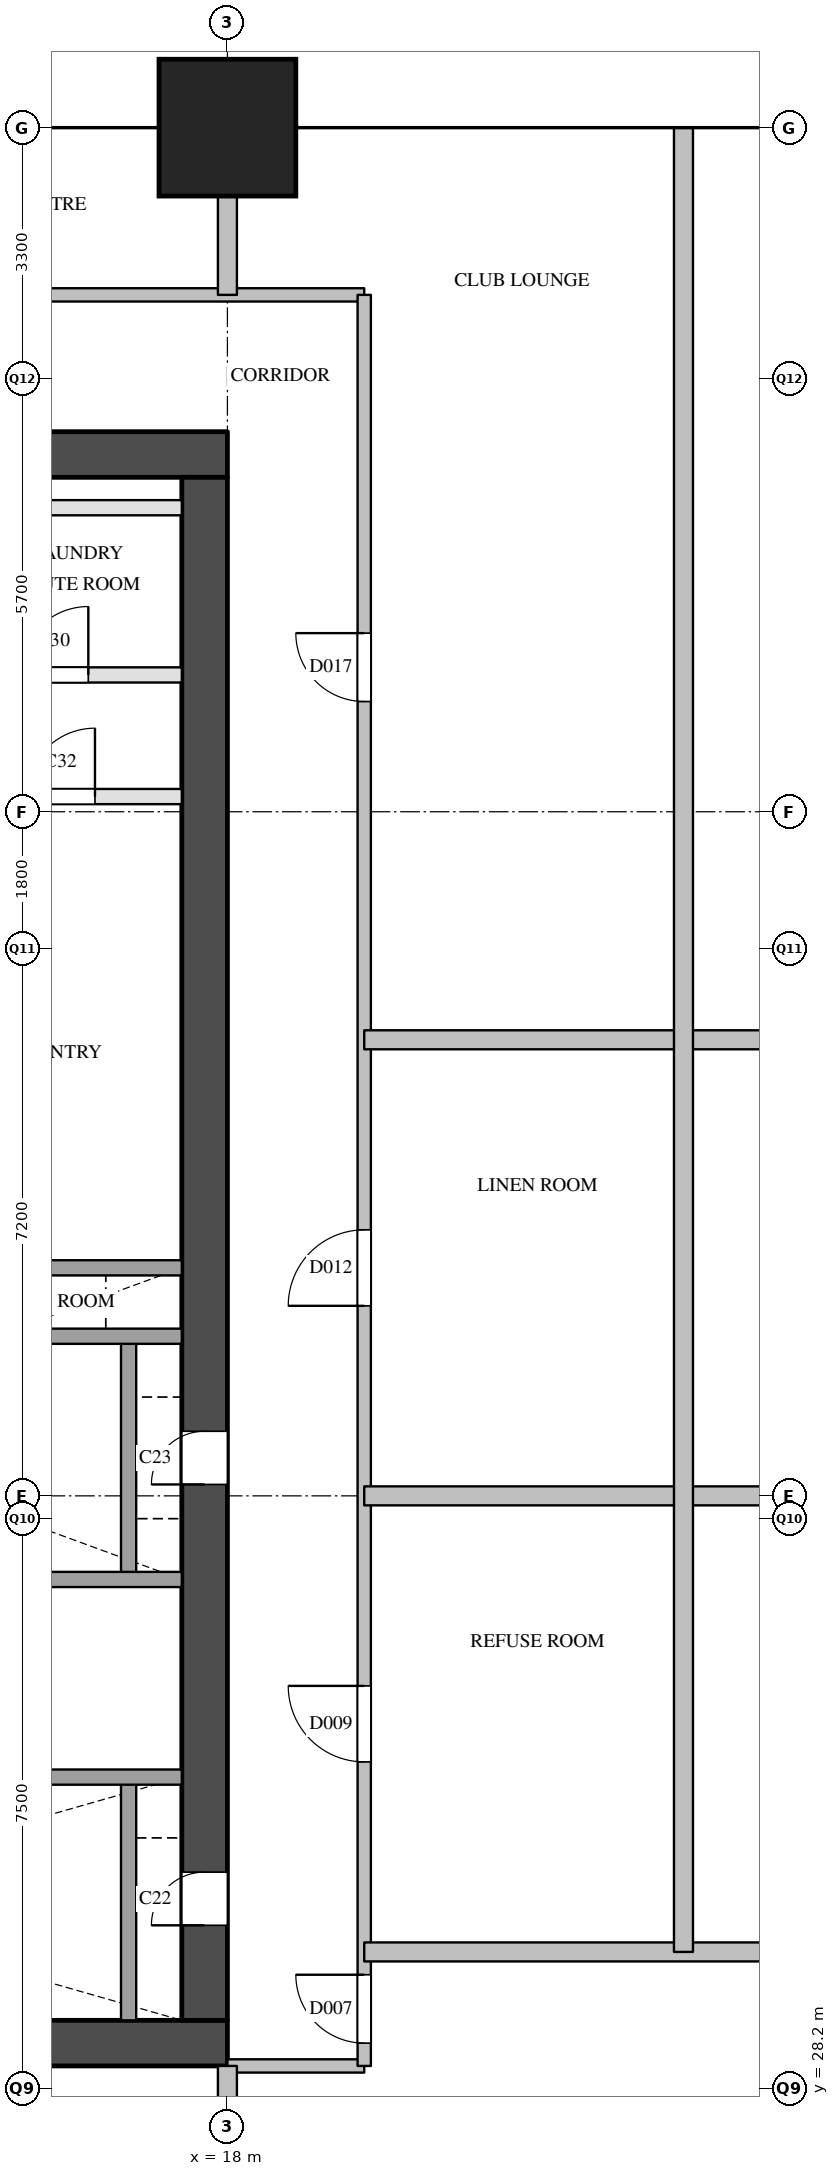
"""IFC4 building model, lengths in metres.
Left out: names, types, materials, properties, quantities, classifications, styles, units other than length and angle.
Written with IfcOpenShell. Run it as: python <this file> out.ifc"""

import sys

from ifc_helpers import new_model, si_unit, direction, frame, frame_2d, origin, origin_2d, place, context, subcontext, project, spatial, rectangle, extrude, element, fill, save


model = new_model("IFC4")
c1 = context("Model", 3, precision=1e-05, world=origin(), true_north=direction((0.0, 1.0)))
c2 = subcontext(c1, "Body", "Model", "MODEL_VIEW")
j1 = project(units=[si_unit("LENGTHUNIT", "METRE"), si_unit("PLANEANGLEUNIT", "RADIAN")], contexts=[c1])
p1 = place(None, origin())
s1 = spatial("IfcSite", under=j1, at=p1, CompositionType="ELEMENT")
p2 = place(p1, origin())
s2 = spatial("IfcBuilding", under=s1, at=p2, CompositionType="ELEMENT")
p3 = place(p2, frame((0.0, 0.0, 115.8)))
s3 = spatial("IfcBuildingStorey", under=s2, at=p3, CompositionType="ELEMENT", Elevation=115.8)
p4 = place(p3, frame((18.0, 54.0, 0.0), z_axis=(0.0, 0.0, 1.0), x_axis=(1.0, 0.0, 0.0)))
e1 = element("IfcColumn", 1, at=p4, inside=s3, PredefinedType="COLUMN", context=c2, shape_type="SweptSolid", body=[
    extrude(rectangle(XDim=1.8, YDim=1.8, at=origin_2d()), origin(), (0.0, 0.0, 1.0), 3.8),
])
p5 = place(p3, frame((5.6, 28.8, 0.0), z_axis=(0.0, 0.0, 1.0), x_axis=(1.0, 0.0, 0.0)))
e2 = element("IfcWall", 2, at=p5, inside=s3, PredefinedType="SHEAR", context=c2, shape_type="SweptSolid", body=[
    extrude(rectangle(XDim=12.4, YDim=0.6, at=frame_2d((6.2, 0.0))), origin(), (0.0, 0.0, 1.0), 3.5),
])
p6 = place(p5, frame((1.05, 0.0, 0.0)))
e3 = element("IfcOpeningElement", 3, at=p6, cuts=e2, PredefinedType="OPENING", context=c2, shape_type="SweptSolid", body=[
    extrude(rectangle(XDim=1.2, YDim=2.1, at=frame_2d((0.6, 1.05))), frame((0.0, 0.31, 0.0), z_axis=(0.0, -1.0, 0.0), x_axis=(1.0, 0.0, 0.0)), (0.0, 0.0, 1.0), 0.62),
])
p7 = place(p5, frame((5.25, 0.0, 0.0)))
e4 = element("IfcOpeningElement", 4, at=p7, cuts=e2, PredefinedType="OPENING", context=c2, shape_type="SweptSolid", body=[
    extrude(rectangle(XDim=1.2, YDim=2.1, at=frame_2d((0.6, 1.05))), frame((0.0, 0.31, 0.0), z_axis=(0.0, -1.0, 0.0), x_axis=(1.0, 0.0, 0.0)), (0.0, 0.0, 1.0), 0.62),
])
p8 = place(p5, frame((7.35, 0.0, 0.0)))
e5 = element("IfcOpeningElement", 5, at=p8, cuts=e2, PredefinedType="OPENING", context=c2, shape_type="SweptSolid", body=[
    extrude(rectangle(XDim=1.2, YDim=2.1, at=frame_2d((0.6, 1.05))), frame((0.0, 0.31, 0.0), z_axis=(0.0, -1.0, 0.0), x_axis=(1.0, 0.0, 0.0)), (0.0, 0.0, 1.0), 0.62),
])
p9 = place(p3, frame((5.6, 49.7, 0.0), z_axis=(0.0, 0.0, 1.0), x_axis=(1.0, 0.0, 0.0)))
e6 = element("IfcWall", 6, at=p9, inside=s3, PredefinedType="SHEAR", context=c2, shape_type="SweptSolid", body=[
    extrude(rectangle(XDim=12.4, YDim=0.6, at=frame_2d((6.2, 0.0))), origin(), (0.0, 0.0, 1.0), 3.5),
])
p10 = place(p3, frame((17.7, 29.1, 0.0), z_axis=(0.0, 0.0, 1.0), x_axis=(0.0, 1.0, 0.0)))
e7 = element("IfcWall", 7, at=p10, inside=s3, PredefinedType="SHEAR", context=c2, shape_type="SweptSolid", body=[
    extrude(rectangle(XDim=20.3, YDim=0.6, at=frame_2d((10.15, 0.0))), origin(), (0.0, 0.0, 1.0), 3.5),
])
p11 = place(p10, frame((1.25, 0.0, 0.0)))
e8 = element("IfcOpeningElement", 8, at=p11, cuts=e7, PredefinedType="OPENING", context=c2, shape_type="SweptSolid", body=[
    extrude(rectangle(XDim=0.7, YDim=2.1, at=frame_2d((0.35, 1.05))), frame((0.0, 0.31, 0.0), z_axis=(0.0, -1.0, 0.0), x_axis=(1.0, 0.0, 0.0)), (0.0, 0.0, 1.0), 0.62),
])
p12 = place(p10, frame((7.05, 0.0, 0.0)))
e9 = element("IfcOpeningElement", 9, at=p12, cuts=e7, PredefinedType="OPENING", context=c2, shape_type="SweptSolid", body=[
    extrude(rectangle(XDim=0.7, YDim=2.1, at=frame_2d((0.35, 1.05))), frame((0.0, 0.31, 0.0), z_axis=(0.0, -1.0, 0.0), x_axis=(1.0, 0.0, 0.0)), (0.0, 0.0, 1.0), 0.62),
])
p13 = place(p3, frame((16.7, 29.1, 0.0), z_axis=(0.0, 0.0, 1.0), x_axis=(0.0, 1.0, 0.0)))
e10 = element("IfcWall", 10, at=p13, inside=s3, PredefinedType="SOLIDWALL", context=c2, shape_type="SweptSolid", body=[
    extrude(rectangle(XDim=3.2, YDim=0.2, at=frame_2d((1.6, 0.0))), origin(), (0.0, 0.0, 1.0), 3.5),
])
p14 = place(p3, frame((16.7, 34.9, 0.0), z_axis=(0.0, 0.0, 1.0), x_axis=(0.0, 1.0, 0.0)))
e11 = element("IfcWall", 11, at=p14, inside=s3, PredefinedType="SOLIDWALL", context=c2, shape_type="SweptSolid", body=[
    extrude(rectangle(XDim=3.2, YDim=0.2, at=frame_2d((1.6, 0.0))), origin(), (0.0, 0.0, 1.0), 3.5),
])
p15 = place(p3, frame((6.2, 32.3, 0.0), z_axis=(0.0, 0.0, 1.0), x_axis=(1.0, 0.0, 0.0)))
e12 = element("IfcWall", 12, at=p15, inside=s3, PredefinedType="SOLIDWALL", context=c2, shape_type="SweptSolid", body=[
    extrude(rectangle(XDim=11.2, YDim=0.2, at=frame_2d((5.6, 0.0))), origin(), (0.0, 0.0, 1.0), 3.5),
])
p16 = place(p15, frame((2.55, 0.0, 0.0)))
e13 = element("IfcOpeningElement", 13, at=p16, cuts=e12, PredefinedType="OPENING", context=c2, shape_type="SweptSolid", body=[
    extrude(rectangle(XDim=1.2, YDim=2.1, at=frame_2d((0.6, 1.05))), frame((0.0, 0.11, 0.0), z_axis=(0.0, -1.0, 0.0), x_axis=(1.0, 0.0, 0.0)), (0.0, 0.0, 1.0), 0.22),
])
p17 = place(p3, frame((6.2, 34.9, 0.0), z_axis=(0.0, 0.0, 1.0), x_axis=(1.0, 0.0, 0.0)))
e14 = element("IfcWall", 14, at=p17, inside=s3, PredefinedType="SOLIDWALL", context=c2, shape_type="SweptSolid", body=[
    extrude(rectangle(XDim=11.2, YDim=0.2, at=frame_2d((5.6, 0.0))), origin(), (0.0, 0.0, 1.0), 3.5),
])
p18 = place(p3, frame((6.2, 38.1, 0.0), z_axis=(0.0, 0.0, 1.0), x_axis=(1.0, 0.0, 0.0)))
e15 = element("IfcWall", 15, at=p18, inside=s3, PredefinedType="SOLIDWALL", context=c2, shape_type="SweptSolid", body=[
    extrude(rectangle(XDim=11.2, YDim=0.2, at=frame_2d((5.6, 0.0))), origin(), (0.0, 0.0, 1.0), 3.5),
])
p19 = place(p18, frame((0.45, 0.0, 0.0)))
e16 = element("IfcOpeningElement", 16, at=p19, cuts=e15, PredefinedType="OPENING", context=c2, shape_type="SweptSolid", body=[
    extrude(rectangle(XDim=1.2, YDim=2.1, at=frame_2d((0.6, 1.05))), frame((0.0, 0.11, 0.0), z_axis=(0.0, -1.0, 0.0), x_axis=(1.0, 0.0, 0.0)), (0.0, 0.0, 1.0), 0.22),
])
p20 = place(p18, frame((2.55, 0.0, 0.0)))
e17 = element("IfcOpeningElement", 17, at=p20, cuts=e15, PredefinedType="OPENING", context=c2, shape_type="SweptSolid", body=[
    extrude(rectangle(XDim=1.2, YDim=2.1, at=frame_2d((0.6, 1.05))), frame((0.0, 0.11, 0.0), z_axis=(0.0, -1.0, 0.0), x_axis=(1.0, 0.0, 0.0)), (0.0, 0.0, 1.0), 0.22),
])
p21 = place(p18, frame((4.65, 0.0, 0.0)))
e18 = element("IfcOpeningElement", 18, at=p21, cuts=e15, PredefinedType="OPENING", context=c2, shape_type="SweptSolid", body=[
    extrude(rectangle(XDim=1.2, YDim=2.1, at=frame_2d((0.6, 1.05))), frame((0.0, 0.11, 0.0), z_axis=(0.0, -1.0, 0.0), x_axis=(1.0, 0.0, 0.0)), (0.0, 0.0, 1.0), 0.22),
])
p22 = place(p18, frame((6.75, 0.0, 0.0)))
e19 = element("IfcOpeningElement", 19, at=p22, cuts=e15, PredefinedType="OPENING", context=c2, shape_type="SweptSolid", body=[
    extrude(rectangle(XDim=1.2, YDim=2.1, at=frame_2d((0.6, 1.05))), frame((0.0, 0.11, 0.0), z_axis=(0.0, -1.0, 0.0), x_axis=(1.0, 0.0, 0.0)), (0.0, 0.0, 1.0), 0.22),
])
p23 = place(p3, frame((12.5, 39.0, 0.0), z_axis=(0.0, 0.0, 1.0), x_axis=(1.0, 0.0, 0.0)))
e20 = element("IfcWall", 20, at=p23, inside=s3, PredefinedType="SOLIDWALL", context=c2, shape_type="SweptSolid", body=[
    extrude(rectangle(XDim=4.9, YDim=0.2, at=frame_2d((2.45, 0.0))), origin(), (0.0, 0.0, 1.0), 3.5),
])
p24 = place(p3, frame((12.5, 45.2, 0.0), z_axis=(0.0, 0.0, 1.0), x_axis=(1.0, 0.0, 0.0)))
e21 = element("IfcWall", 21, at=p24, inside=s3, PredefinedType="PARTITIONING", context=c2, shape_type="SweptSolid", body=[
    extrude(rectangle(XDim=4.9, YDim=0.2, at=frame_2d((2.45, 0.0))), origin(), (0.0, 0.0, 1.0), 3.5),
])
p25 = place(p24, frame((0.407, 0.0, 0.0)))
e22 = element("IfcOpeningElement", 22, at=p25, cuts=e21, PredefinedType="OPENING", context=c2, shape_type="SweptSolid", body=[
    extrude(rectangle(XDim=0.9, YDim=2.1, at=frame_2d((0.45, 1.05))), frame((0.0, 0.11, 0.0), z_axis=(0.0, -1.0, 0.0), x_axis=(1.0, 0.0, 0.0)), (0.0, 0.0, 1.0), 0.22),
])
p26 = place(p24, frame((2.857, 0.0, 0.0)))
e23 = element("IfcOpeningElement", 23, at=p26, cuts=e21, PredefinedType="OPENING", context=c2, shape_type="SweptSolid", body=[
    extrude(rectangle(XDim=0.9, YDim=2.1, at=frame_2d((0.45, 1.05))), frame((0.0, 0.11, 0.0), z_axis=(0.0, -1.0, 0.0), x_axis=(1.0, 0.0, 0.0)), (0.0, 0.0, 1.0), 0.22),
])
p27 = place(p3, frame((6.2, 46.8, 0.0), z_axis=(0.0, 0.0, 1.0), x_axis=(1.0, 0.0, 0.0)))
e24 = element("IfcWall", 24, at=p27, inside=s3, PredefinedType="PARTITIONING", context=c2, shape_type="SweptSolid", body=[
    extrude(rectangle(XDim=11.2, YDim=0.2, at=frame_2d((5.6, 0.0))), origin(), (0.0, 0.0, 1.0), 3.5),
])
p28 = place(p27, frame((0.67, 0.0, 0.0)))
e25 = element("IfcOpeningElement", 25, at=p28, cuts=e24, PredefinedType="OPENING", context=c2, shape_type="SweptSolid", body=[
    extrude(rectangle(XDim=0.9, YDim=2.1, at=frame_2d((0.45, 1.05))), frame((0.0, 0.11, 0.0), z_axis=(0.0, -1.0, 0.0), x_axis=(1.0, 0.0, 0.0)), (0.0, 0.0, 1.0), 0.22),
])
p29 = place(p27, frame((4.59, 0.0, 0.0)))
e26 = element("IfcOpeningElement", 26, at=p29, cuts=e24, PredefinedType="OPENING", context=c2, shape_type="SweptSolid", body=[
    extrude(rectangle(XDim=0.9, YDim=2.1, at=frame_2d((0.45, 1.05))), frame((0.0, 0.11, 0.0), z_axis=(0.0, -1.0, 0.0), x_axis=(1.0, 0.0, 0.0)), (0.0, 0.0, 1.0), 0.22),
])
p30 = place(p27, frame((9.07, 0.0, 0.0)))
e27 = element("IfcOpeningElement", 27, at=p30, cuts=e24, PredefinedType="OPENING", context=c2, shape_type="SweptSolid", body=[
    extrude(rectangle(XDim=0.9, YDim=2.1, at=frame_2d((0.45, 1.05))), frame((0.0, 0.11, 0.0), z_axis=(0.0, -1.0, 0.0), x_axis=(1.0, 0.0, 0.0)), (0.0, 0.0, 1.0), 0.22),
])
p31 = place(p3, frame((6.2, 49.0, 0.0), z_axis=(0.0, 0.0, 1.0), x_axis=(1.0, 0.0, 0.0)))
e28 = element("IfcWall", 28, at=p31, inside=s3, PredefinedType="PARTITIONING", context=c2, shape_type="SweptSolid", body=[
    extrude(rectangle(XDim=11.2, YDim=0.2, at=frame_2d((5.6, 0.0))), origin(), (0.0, 0.0, 1.0), 3.5),
])
p32 = place(p3, frame((18.0, 28.5, 0.0), z_axis=(0.0, 0.0, 1.0), x_axis=(1.0, 0.0, 0.0)))
e29 = element("IfcWall", 29, at=p32, inside=s3, PredefinedType="PARTITIONING", context=c2, shape_type="SweptSolid", body=[
    extrude(rectangle(XDim=1.8, YDim=0.175, at=frame_2d((0.9, 0.0))), origin(), (0.0, 0.0, 1.0), 3.5),
])
p33 = place(p3, frame((3.8, 51.8, 0.0), z_axis=(0.0, 0.0, 1.0), x_axis=(1.0, 0.0, 0.0)))
e30 = element("IfcWall", 30, at=p33, inside=s3, PredefinedType="PARTITIONING", context=c2, shape_type="SweptSolid", body=[
    extrude(rectangle(XDim=16.0, YDim=0.175, at=frame_2d((8.0, 0.0))), origin(), (0.0, 0.0, 1.0), 3.5),
])
p34 = place(p33, frame((7.75, 0.0, 0.0)))
e31 = element("IfcOpeningElement", 31, at=p34, cuts=e30, PredefinedType="OPENING", context=c2, shape_type="SweptSolid", body=[
    extrude(rectangle(XDim=0.9, YDim=2.1, at=frame_2d((0.45, 1.05))), frame((0.0, 0.097, 0.0), z_axis=(0.0, -1.0, 0.0), x_axis=(1.0, 0.0, 0.0)), (0.0, 0.0, 1.0), 0.195),
])
p35 = place(p3, frame((19.8, 28.5, 0.0), z_axis=(0.0, 0.0, 1.0), x_axis=(0.0, 1.0, 0.0)))
e32 = element("IfcWall", 32, at=p35, inside=s3, PredefinedType="PARTITIONING", context=c2, shape_type="SweptSolid", body=[
    extrude(rectangle(XDim=23.3, YDim=0.175, at=frame_2d((11.65, 0.0))), origin(), (0.0, 0.0, 1.0), 3.5),
])
p36 = place(p35, frame((0.3, 0.0, 0.0)))
e33 = element("IfcOpeningElement", 33, at=p36, cuts=e32, PredefinedType="OPENING", context=c2, shape_type="SweptSolid", body=[
    extrude(rectangle(XDim=0.9, YDim=2.1, at=frame_2d((0.45, 1.05))), frame((0.0, 0.097, 0.0), z_axis=(0.0, -1.0, 0.0), x_axis=(1.0, 0.0, 0.0)), (0.0, 0.0, 1.0), 0.195),
])
p37 = place(p35, frame((4.0, 0.0, 0.0)))
e34 = element("IfcOpeningElement", 34, at=p37, cuts=e32, PredefinedType="OPENING", context=c2, shape_type="SweptSolid", body=[
    extrude(rectangle(XDim=1.0, YDim=2.1, at=frame_2d((0.5, 1.05))), frame((0.0, 0.097, 0.0), z_axis=(0.0, -1.0, 0.0), x_axis=(1.0, 0.0, 0.0)), (0.0, 0.0, 1.0), 0.195),
])
p38 = place(p35, frame((10.0, 0.0, 0.0)))
e35 = element("IfcOpeningElement", 35, at=p38, cuts=e32, PredefinedType="OPENING", context=c2, shape_type="SweptSolid", body=[
    extrude(rectangle(XDim=1.0, YDim=2.1, at=frame_2d((0.5, 1.05))), frame((0.0, 0.097, 0.0), z_axis=(0.0, -1.0, 0.0), x_axis=(1.0, 0.0, 0.0)), (0.0, 0.0, 1.0), 0.195),
])
p39 = place(p35, frame((17.95, 0.0, 0.0)))
e36 = element("IfcOpeningElement", 36, at=p39, cuts=e32, PredefinedType="OPENING", context=c2, shape_type="SweptSolid", body=[
    extrude(rectangle(XDim=0.9, YDim=2.1, at=frame_2d((0.45, 1.05))), frame((0.0, 0.097, 0.0), z_axis=(0.0, -1.0, 0.0), x_axis=(1.0, 0.0, 0.0)), (0.0, 0.0, 1.0), 0.195),
])
p40 = place(p3, frame((19.8, 30.0, 0.0), z_axis=(0.0, 0.0, 1.0), x_axis=(1.0, 0.0, 0.0)))
e37 = element("IfcWall", 37, at=p40, inside=s3, PredefinedType="PARTITIONING", context=c2, shape_type="SweptSolid", body=[
    extrude(rectangle(XDim=14.4, YDim=0.25, at=frame_2d((7.2, 0.0))), origin(), (0.0, 0.0, 1.0), 2.5),
])
p41 = place(p3, frame((19.8, 36.0, 0.0), z_axis=(0.0, 0.0, 1.0), x_axis=(1.0, 0.0, 0.0)))
e38 = element("IfcWall", 38, at=p41, inside=s3, PredefinedType="PARTITIONING", context=c2, shape_type="SweptSolid", body=[
    extrude(rectangle(XDim=14.4, YDim=0.25, at=frame_2d((7.2, 0.0))), origin(), (0.0, 0.0, 1.0), 3.5),
])
p42 = place(p3, frame((19.8, 42.0, 0.0), z_axis=(0.0, 0.0, 1.0), x_axis=(1.0, 0.0, 0.0)))
e39 = element("IfcWall", 39, at=p42, inside=s3, PredefinedType="PARTITIONING", context=c2, shape_type="SweptSolid", body=[
    extrude(rectangle(XDim=14.4, YDim=0.25, at=frame_2d((7.2, 0.0))), origin(), (0.0, 0.0, 1.0), 2.5),
])
p43 = place(p3, frame((18.0, 27.0, 0.0), z_axis=(0.0, 0.0, 1.0), x_axis=(0.0, 1.0, 0.0)))
e40 = element("IfcWall", 40, at=p43, inside=s3, PredefinedType="PARTITIONING", context=c2, shape_type="SweptSolid", body=[
    extrude(rectangle(XDim=1.5, YDim=0.25, at=frame_2d((0.75, 0.0))), origin(), (0.0, 0.0, 1.0), 3.5),
])
p44 = place(p3, frame((18.0, 51.8, 0.0), z_axis=(0.0, 0.0, 1.0), x_axis=(0.0, 1.0, 0.0)))
e41 = element("IfcWall", 41, at=p44, inside=s3, PredefinedType="PARTITIONING", context=c2, shape_type="SweptSolid", body=[
    extrude(rectangle(XDim=2.2, YDim=0.25, at=frame_2d((1.1, 0.0))), origin(), (0.0, 0.0, 1.0), 3.5),
])
p45 = place(p3, frame((24.0, 30.0, 0.0), z_axis=(0.0, 0.0, 1.0), x_axis=(0.0, 1.0, 0.0)))
e42 = element("IfcWall", 42, at=p45, inside=s3, PredefinedType="PARTITIONING", context=c2, shape_type="SweptSolid", body=[
    extrude(rectangle(XDim=24.0, YDim=0.25, at=frame_2d((12.0, 0.0))), origin(), (0.0, 0.0, 1.0), 2.5),
])
p46 = place(p11, origin())
e43 = element("IfcDoor", 43, at=p46, inside=s3, OperationType="SINGLE_SWING_LEFT", PredefinedType="DOOR", context=c2, shape_type="SweptSolid", body=[
    extrude(rectangle(XDim=0.7, YDim=2.1, at=frame_2d((0.35, 1.05))), frame((0.0, 0.025, 0.0), z_axis=(0.0, -1.0, 0.0), x_axis=(1.0, 0.0, 0.0)), (0.0, 0.0, 1.0), 0.05),
])
fill(e8, e43)
p47 = place(p12, origin())
e44 = element("IfcDoor", 44, at=p47, inside=s3, OperationType="SINGLE_SWING_LEFT", PredefinedType="DOOR", context=c2, shape_type="SweptSolid", body=[
    extrude(rectangle(XDim=0.7, YDim=2.1, at=frame_2d((0.35, 1.05))), frame((0.0, 0.025, 0.0), z_axis=(0.0, -1.0, 0.0), x_axis=(1.0, 0.0, 0.0)), (0.0, 0.0, 1.0), 0.05),
])
fill(e9, e44)
p48 = place(p30, origin())
e45 = element("IfcDoor", 45, at=p48, inside=s3, OperationType="SINGLE_SWING_RIGHT", PredefinedType="DOOR", context=c2, shape_type="SweptSolid", body=[
    extrude(rectangle(XDim=0.9, YDim=2.1, at=frame_2d((0.45, 1.05))), frame((0.0, 0.025, 0.0), z_axis=(0.0, -1.0, 0.0), x_axis=(1.0, 0.0, 0.0)), (0.0, 0.0, 1.0), 0.05),
])
fill(e27, e45)
p49 = place(p26, origin())
e46 = element("IfcDoor", 46, at=p49, inside=s3, OperationType="SINGLE_SWING_RIGHT", PredefinedType="DOOR", context=c2, shape_type="SweptSolid", body=[
    extrude(rectangle(XDim=0.9, YDim=2.1, at=frame_2d((0.45, 1.05))), frame((0.0, 0.025, 0.0), z_axis=(0.0, -1.0, 0.0), x_axis=(1.0, 0.0, 0.0)), (0.0, 0.0, 1.0), 0.05),
])
fill(e23, e46)
p50 = place(p36, origin())
e47 = element("IfcDoor", 47, at=p50, inside=s3, OperationType="SINGLE_SWING_RIGHT", PredefinedType="DOOR", context=c2, shape_type="SweptSolid", body=[
    extrude(rectangle(XDim=0.9, YDim=2.1, at=frame_2d((0.45, 1.05))), frame((0.0, 0.025, 0.0), z_axis=(0.0, -1.0, 0.0), x_axis=(1.0, 0.0, 0.0)), (0.0, 0.0, 1.0), 0.05),
])
fill(e33, e47)
p51 = place(p37, origin())
e48 = element("IfcDoor", 48, at=p51, inside=s3, OperationType="SINGLE_SWING_RIGHT", PredefinedType="DOOR", context=c2, shape_type="SweptSolid", body=[
    extrude(rectangle(XDim=1.0, YDim=2.1, at=frame_2d((0.5, 1.05))), frame((0.0, 0.025, 0.0), z_axis=(0.0, -1.0, 0.0), x_axis=(1.0, 0.0, 0.0)), (0.0, 0.0, 1.0), 0.05),
])
fill(e34, e48)
p52 = place(p38, origin())
e49 = element("IfcDoor", 49, at=p52, inside=s3, OperationType="SINGLE_SWING_LEFT", PredefinedType="DOOR", context=c2, shape_type="SweptSolid", body=[
    extrude(rectangle(XDim=1.0, YDim=2.1, at=frame_2d((0.5, 1.05))), frame((0.0, 0.025, 0.0), z_axis=(0.0, -1.0, 0.0), x_axis=(1.0, 0.0, 0.0)), (0.0, 0.0, 1.0), 0.05),
])
fill(e35, e49)
p53 = place(p39, origin())
e50 = element("IfcDoor", 50, at=p53, inside=s3, OperationType="SINGLE_SWING_RIGHT", PredefinedType="DOOR", context=c2, shape_type="SweptSolid", body=[
    extrude(rectangle(XDim=0.9, YDim=2.1, at=frame_2d((0.45, 1.05))), frame((0.0, 0.025, 0.0), z_axis=(0.0, -1.0, 0.0), x_axis=(1.0, 0.0, 0.0)), (0.0, 0.0, 1.0), 0.05),
])
fill(e36, e50)
save(model, sys.argv[1])
